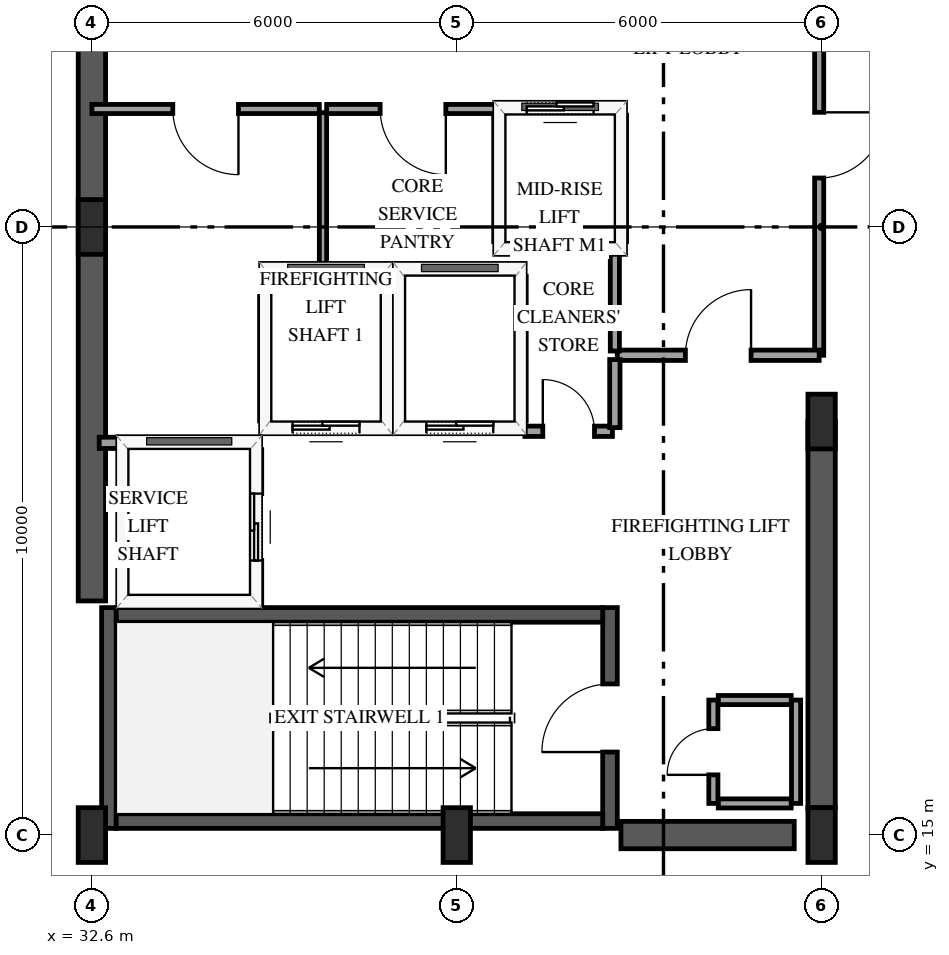
"""IFC4 building model, lengths in metres.
Left out: names, types, materials, properties, quantities, classifications, styles, units other than length and angle.
Written with IfcOpenShell. Run it as: python <this file> out.ifc"""

import sys

from ifc_helpers import new_model, si_unit, direction, frame, frame_2d, origin, origin_2d, place, context, subcontext, project, spatial, rectangle, extrude, element, fill, save


model = new_model("IFC4")
c1 = context("Model", 3, precision=1e-05, world=origin(), true_north=direction((0.0, 1.0)))
c2 = subcontext(c1, "Body", "Model", "MODEL_VIEW")
j1 = project(units=[si_unit("LENGTHUNIT", "METRE"), si_unit("PLANEANGLEUNIT", "RADIAN")], contexts=[c1])
p1 = place(None, origin())
s1 = spatial("IfcSite", under=j1, at=p1, CompositionType="ELEMENT")
p2 = place(p1, origin())
s2 = spatial("IfcBuilding", under=s1, at=p2, CompositionType="ELEMENT")
p3 = place(p2, frame((0.0, 0.0, 237.4)))
s3 = spatial("IfcBuildingStorey", under=s2, at=p3, CompositionType="ELEMENT", Elevation=237.4)
p4 = place(p3, frame((32.88, 15.11, 0.0), z_axis=(0.0, 0.0, 1.0), x_axis=(0.0, 1.0, 0.0)))
e1 = element("IfcWall", 1, at=p4, inside=s3, PredefinedType="SHEAR", context=c2, shape_type="SweptSolid", body=[
    extrude(rectangle(XDim=3.63, YDim=0.24, at=frame_2d((1.815, 0.0))), origin(), (0.0, 0.0, 1.0), 5.1),
])
p5 = place(p3, frame((41.12, 15.11, 0.0), z_axis=(0.0, 0.0, 1.0), x_axis=(0.0, 1.0, 0.0)))
e2 = element("IfcWall", 2, at=p5, inside=s3, PredefinedType="SHEAR", context=c2, shape_type="SweptSolid", body=[
    extrude(rectangle(XDim=3.63, YDim=0.24, at=frame_2d((1.815, 0.0))), origin(), (0.0, 0.0, 1.0), 5.1),
])
p6 = place(p5, frame((1.255, 0.0, 0.0)))
e3 = element("IfcOpeningElement", 3, at=p6, cuts=e2, PredefinedType="OPENING", context=c2, shape_type="SweptSolid", body=[
    extrude(rectangle(XDim=1.12, YDim=2.15, at=frame_2d((0.56, 1.075))), frame((0.0, 0.13, 0.0), z_axis=(0.0, -1.0, 0.0), x_axis=(1.0, 0.0, 0.0)), (0.0, 0.0, 1.0), 0.26),
])
for number, where, z_axis, x_axis in (
    (4, (33.0, 15.23, 0.0), (0.0, 0.0, 1.0), (1.0, 0.0, 0.0)),
    (5, (33.0, 18.62, 0.0), (0.0, 0.0, 1.0), (1.0, 0.0, 0.0)),
):
    element("IfcWall", number, at=place(p3, frame(where, z_axis=z_axis, x_axis=x_axis)), inside=s3, PredefinedType="SHEAR", context=c2, shape_type="SweptSolid", body=[
        extrude(rectangle(XDim=8.0, YDim=0.24, at=frame_2d((4.0, 0.0))), origin(), (0.0, 0.0, 1.0), 5.1),
    ])
p7 = place(p3, frame((32.6, 18.85, 0.0), z_axis=(0.0, 0.0, 1.0), x_axis=(0.0, 1.0, 0.0)))
e6 = element("IfcWall", 6, at=p7, inside=s3, PredefinedType="SHEAR", context=c2, shape_type="SweptSolid", body=[
    extrude(rectangle(XDim=12.3, YDim=0.45, at=frame_2d((6.15, 0.0))), origin(), (0.0, 0.0, 1.0), 5.1),
])
p8 = place(p3, frame((41.3, 15.0, 0.0), z_axis=(0.0, 0.0, 1.0), x_axis=(1.0, 0.0, 0.0)))
e7 = element("IfcWall", 7, at=p8, inside=s3, PredefinedType="SHEAR", context=c2, shape_type="SweptSolid", body=[
    extrude(rectangle(XDim=2.85, YDim=0.45, at=frame_2d((1.425, 0.0))), origin(), (0.0, 0.0, 1.0), 5.1),
])
p9 = place(p3, frame((44.6, 15.45, 0.0), z_axis=(0.0, 0.0, 1.0), x_axis=(0.0, 1.0, 0.0)))
e8 = element("IfcWall", 8, at=p9, inside=s3, PredefinedType="SHEAR", context=c2, shape_type="SweptSolid", body=[
    extrude(rectangle(XDim=6.35, YDim=0.45, at=frame_2d((3.175, 0.0))), origin(), (0.0, 0.0, 1.0), 5.1),
])
for number, where, z_axis, x_axis in (
    (9, (32.6, 15.0, 0.0), (0.0, 0.0, 1.0), (1.0, 0.0, 0.0)),
    (10, (32.6, 25.0, 0.0), (0.0, 0.0, 1.0), (1.0, 0.0, 0.0)),
    (11, (38.6, 15.0, 0.0), (0.0, 0.0, 1.0), (1.0, 0.0, 0.0)),
    (12, (44.6, 15.0, 0.0), (0.0, 0.0, 1.0), (1.0, 0.0, 0.0)),
    (13, (44.6, 21.8, 0.0), (0.0, 0.0, 1.0), (1.0, 0.0, 0.0)),
):
    element("IfcColumn", number, at=place(p3, frame(where, z_axis=z_axis, x_axis=x_axis)), inside=s3, PredefinedType="PILASTER", context=c2, shape_type="SweptSolid", body=[
        extrude(rectangle(XDim=0.45, YDim=0.9, at=origin_2d()), origin(), (0.0, 0.0, 1.0), 4.8),
    ])
p10 = place(p3, frame((35.45, 21.7, 0.0), z_axis=(0.0, 0.0, 1.0), x_axis=(1.0, 0.0, 0.0)))
e14 = element("IfcWall", 14, at=p10, inside=s3, PredefinedType="SOLIDWALL", context=c2, shape_type="SweptSolid", body=[
    extrude(rectangle(XDim=2.0, YDim=0.185, at=frame_2d((1.0, 0.0))), origin(), (0.0, 0.0, 1.0), 4.8),
])
p11 = place(p10, frame((0.45, 0.0, 0.0)))
e15 = element("IfcOpeningElement", 15, at=p11, cuts=e14, PredefinedType="OPENING", context=c2, shape_type="SweptSolid", body=[
    extrude(rectangle(XDim=1.1, YDim=2.15, at=frame_2d((0.55, 1.075))), frame((0.0, 0.103, 0.0), z_axis=(0.0, -1.0, 0.0), x_axis=(1.0, 0.0, 0.0)), (0.0, 0.0, 1.0), 0.205),
])
p12 = place(p3, frame((35.45, 24.3, 0.0), z_axis=(0.0, 0.0, 1.0), x_axis=(1.0, 0.0, 0.0)))
e16 = element("IfcWall", 16, at=p12, inside=s3, PredefinedType="SOLIDWALL", context=c2, shape_type="SweptSolid", body=[
    extrude(rectangle(XDim=2.0, YDim=0.185, at=frame_2d((1.0, 0.0))), origin(), (0.0, 0.0, 1.0), 4.8),
])
for number, where, z_axis, x_axis in (
    (17, (35.45, 21.81, 0.0), (0.0, 0.0, 1.0), (0.0, 1.0, 0.0)),
    (18, (37.45, 21.81, 0.0), (0.0, 0.0, 1.0), (0.0, 1.0, 0.0)),
):
    element("IfcWall", number, at=place(p3, frame(where, z_axis=z_axis, x_axis=x_axis)), inside=s3, PredefinedType="SOLIDWALL", context=c2, shape_type="SweptSolid", body=[
        extrude(rectangle(XDim=2.38, YDim=0.185, at=frame_2d((1.19, 0.0))), origin(), (0.0, 0.0, 1.0), 4.8),
    ])
p13 = place(p3, frame((37.65, 21.7, 0.0), z_axis=(0.0, 0.0, 1.0), x_axis=(1.0, 0.0, 0.0)))
e19 = element("IfcWall", 19, at=p13, inside=s3, PredefinedType="SOLIDWALL", context=c2, shape_type="SweptSolid", body=[
    extrude(rectangle(XDim=2.0, YDim=0.185, at=frame_2d((1.0, 0.0))), origin(), (0.0, 0.0, 1.0), 4.8),
])
p14 = place(p13, frame((0.45, 0.0, 0.0)))
e20 = element("IfcOpeningElement", 20, at=p14, cuts=e19, PredefinedType="OPENING", context=c2, shape_type="SweptSolid", body=[
    extrude(rectangle(XDim=1.1, YDim=2.15, at=frame_2d((0.55, 1.075))), frame((0.0, 0.103, 0.0), z_axis=(0.0, -1.0, 0.0), x_axis=(1.0, 0.0, 0.0)), (0.0, 0.0, 1.0), 0.205),
])
p15 = place(p3, frame((37.65, 24.3, 0.0), z_axis=(0.0, 0.0, 1.0), x_axis=(1.0, 0.0, 0.0)))
e21 = element("IfcWall", 21, at=p15, inside=s3, PredefinedType="SOLIDWALL", context=c2, shape_type="SweptSolid", body=[
    extrude(rectangle(XDim=2.0, YDim=0.185, at=frame_2d((1.0, 0.0))), origin(), (0.0, 0.0, 1.0), 4.8),
])
p16 = place(p3, frame((39.65, 21.81, 0.0), z_axis=(0.0, 0.0, 1.0), x_axis=(0.0, 1.0, 0.0)))
e22 = element("IfcWall", 22, at=p16, inside=s3, PredefinedType="SOLIDWALL", context=c2, shape_type="SweptSolid", body=[
    extrude(rectangle(XDim=2.38, YDim=0.185, at=frame_2d((1.19, 0.0))), origin(), (0.0, 0.0, 1.0), 4.8),
])
p17 = place(p3, frame((32.72, 21.45, 0.0), z_axis=(0.0, 0.0, 1.0), x_axis=(1.0, 0.0, 0.0)))
e23 = element("IfcWall", 23, at=p17, inside=s3, PredefinedType="SOLIDWALL", context=c2, shape_type="SweptSolid", body=[
    extrude(rectangle(XDim=2.58, YDim=0.185, at=frame_2d((1.29, 0.0))), origin(), (0.0, 0.0, 1.0), 4.8),
])
p18 = place(p3, frame((35.3, 18.79, 0.0), z_axis=(0.0, 0.0, 1.0), x_axis=(0.0, 1.0, 0.0)))
e24 = element("IfcWall", 24, at=p18, inside=s3, PredefinedType="SOLIDWALL", context=c2, shape_type="SweptSolid", body=[
    extrude(rectangle(XDim=2.55, YDim=0.185, at=frame_2d((1.275, 0.0))), origin(), (0.0, 0.0, 1.0), 4.8),
])
p19 = place(p18, frame((0.725, 0.0, 0.0)))
e25 = element("IfcOpeningElement", 25, at=p19, cuts=e24, PredefinedType="OPENING", context=c2, shape_type="SweptSolid", body=[
    extrude(rectangle(XDim=1.1, YDim=2.15, at=frame_2d((0.55, 1.075))), frame((0.0, 0.103, 0.0), z_axis=(0.0, -1.0, 0.0), x_axis=(1.0, 0.0, 0.0)), (0.0, 0.0, 1.0), 0.205),
])
p20 = place(p3, frame((39.3, 24.65, 0.0), z_axis=(0.0, 0.0, 1.0), x_axis=(1.0, 0.0, 0.0)))
e26 = element("IfcWall", 26, at=p20, inside=s3, PredefinedType="SOLIDWALL", context=c2, shape_type="SweptSolid", body=[
    extrude(rectangle(XDim=2.0, YDim=0.185, at=frame_2d((1.0, 0.0))), origin(), (0.0, 0.0, 1.0), 4.8),
])
p21 = place(p3, frame((39.3, 26.95, 0.0), z_axis=(0.0, 0.0, 1.0), x_axis=(1.0, 0.0, 0.0)))
e27 = element("IfcWall", 27, at=p21, inside=s3, PredefinedType="SOLIDWALL", context=c2, shape_type="SweptSolid", body=[
    extrude(rectangle(XDim=2.0, YDim=0.185, at=frame_2d((1.0, 0.0))), origin(), (0.0, 0.0, 1.0), 4.8),
])
p22 = place(p21, frame((0.45, 0.0, 0.0)))
e28 = element("IfcOpeningElement", 28, at=p22, cuts=e27, PredefinedType="OPENING", context=c2, shape_type="SweptSolid", body=[
    extrude(rectangle(XDim=1.1, YDim=2.15, at=frame_2d((0.55, 1.075))), frame((0.0, 0.103, 0.0), z_axis=(0.0, -1.0, 0.0), x_axis=(1.0, 0.0, 0.0)), (0.0, 0.0, 1.0), 0.205),
])
for number, where, z_axis, x_axis in (
    (29, (39.3, 24.76, 0.0), (0.0, 0.0, 1.0), (0.0, 1.0, 0.0)),
    (30, (41.3, 24.76, 0.0), (0.0, 0.0, 1.0), (0.0, 1.0, 0.0)),
):
    element("IfcWall", number, at=place(p3, frame(where, z_axis=z_axis, x_axis=x_axis)), inside=s3, PredefinedType="SOLIDWALL", context=c2, shape_type="SweptSolid", body=[
        extrude(rectangle(XDim=2.08, YDim=0.185, at=frame_2d((1.04, 0.0))), origin(), (0.0, 0.0, 1.0), 4.8),
    ])
for number, where, z_axis, x_axis in (
    (31, (42.9, 15.52, 0.0), (0.0, 0.0, 1.0), (1.0, 0.0, 0.0)),
    (32, (42.9, 17.22, 0.0), (0.0, 0.0, 1.0), (1.0, 0.0, 0.0)),
):
    element("IfcWall", number, at=place(p3, frame(where, z_axis=z_axis, x_axis=x_axis)), inside=s3, PredefinedType="PARTITIONING", context=c2, shape_type="SweptSolid", body=[
        extrude(rectangle(XDim=1.2, YDim=0.15, at=frame_2d((0.6, 0.0))), origin(), (0.0, 0.0, 1.0), 4.8),
    ])
p23 = place(p3, frame((44.18, 15.52, 0.0), z_axis=(0.0, 0.0, 1.0), x_axis=(0.0, 1.0, 0.0)))
e33 = element("IfcWall", 33, at=p23, inside=s3, PredefinedType="PARTITIONING", context=c2, shape_type="SweptSolid", body=[
    extrude(rectangle(XDim=1.7, YDim=0.15, at=frame_2d((0.85, 0.0))), origin(), (0.0, 0.0, 1.0), 4.8),
])
p24 = place(p3, frame((42.82, 15.52, 0.0), z_axis=(0.0, 0.0, 1.0), x_axis=(0.0, 1.0, 0.0)))
e34 = element("IfcWall", 34, at=p24, inside=s3, PredefinedType="PARTITIONING", context=c2, shape_type="SweptSolid", body=[
    extrude(rectangle(XDim=1.7, YDim=0.15, at=frame_2d((0.85, 0.0))), origin(), (0.0, 0.0, 1.0), 4.8),
])
p25 = place(p24, frame((0.47, 0.0, 0.0)))
e35 = element("IfcOpeningElement", 35, at=p25, cuts=e34, PredefinedType="OPENING", context=c2, shape_type="SweptSolid", body=[
    extrude(rectangle(XDim=0.76, YDim=2.0, at=frame_2d((0.38, 1.0))), frame((0.0, 0.085, 0.0), z_axis=(0.0, -1.0, 0.0), x_axis=(1.0, 0.0, 0.0)), (0.0, 0.0, 1.0), 0.17),
])
p26 = place(p3, frame((44.56, 29.8, 0.0), z_axis=(0.0, 0.0, 1.0), x_axis=(0.0, -1.0, 0.0)))
e36 = element("IfcWall", 36, at=p26, inside=s3, PredefinedType="PARTITIONING", context=c2, shape_type="SweptSolid", body=[
    extrude(rectangle(XDim=6.91, YDim=0.15, at=frame_2d((3.455, 0.0))), origin(), (0.0, 0.0, 1.0), 3.84),
])
p27 = place(p26, frame((2.915, 0.0, 0.0)))
e37 = element("IfcOpeningElement", 37, at=p27, cuts=e36, PredefinedType="OPENING", context=c2, shape_type="SweptSolid", body=[
    extrude(rectangle(XDim=1.08, YDim=2.15, at=frame_2d((0.54, 1.075))), frame((0.0, 0.085, 0.0), z_axis=(0.0, -1.0, 0.0), x_axis=(1.0, 0.0, 0.0)), (0.0, 0.0, 1.0), 0.17),
])
p28 = place(p3, frame((36.34, 26.94, 0.0), z_axis=(0.0, 0.0, 1.0), x_axis=(-1.0, 0.0, 0.0)))
e38 = element("IfcWall", 38, at=p28, inside=s3, PredefinedType="PARTITIONING", context=c2, shape_type="SweptSolid", body=[
    extrude(rectangle(XDim=3.74, YDim=0.15, at=frame_2d((1.87, 0.0))), origin(), (0.0, 0.0, 1.0), 4.8),
])
p29 = place(p28, frame((1.33, 0.0, 0.0)))
e39 = element("IfcOpeningElement", 39, at=p29, cuts=e38, PredefinedType="OPENING", context=c2, shape_type="SweptSolid", body=[
    extrude(rectangle(XDim=1.08, YDim=2.15, at=frame_2d((0.54, 1.075))), frame((0.0, 0.085, 0.0), z_axis=(0.0, -1.0, 0.0), x_axis=(1.0, 0.0, 0.0)), (0.0, 0.0, 1.0), 0.17),
])
p30 = place(p3, frame((41.24, 22.89, 0.0), z_axis=(0.0, 0.0, 1.0), x_axis=(1.0, 0.0, 0.0)))
e40 = element("IfcWall", 40, at=p30, inside=s3, PredefinedType="PARTITIONING", context=c2, shape_type="SweptSolid", body=[
    extrude(rectangle(XDim=3.32, YDim=0.17, at=frame_2d((1.66, 0.0))), origin(), (0.0, 0.0, 1.0), 4.8),
])
p31 = place(p30, frame((1.12, 0.0, 0.0)))
e41 = element("IfcOpeningElement", 41, at=p31, cuts=e40, PredefinedType="OPENING", context=c2, shape_type="SweptSolid", body=[
    extrude(rectangle(XDim=1.08, YDim=2.15, at=frame_2d((0.54, 1.075))), frame((0.0, 0.095, 0.0), z_axis=(0.0, -1.0, 0.0), x_axis=(1.0, 0.0, 0.0)), (0.0, 0.0, 1.0), 0.19),
])
p32 = place(p3, frame((39.3, 26.94, 0.0), z_axis=(0.0, 0.0, 1.0), x_axis=(-1.0, 0.0, 0.0)))
e42 = element("IfcWall", 42, at=p32, inside=s3, PredefinedType="PARTITIONING", context=c2, shape_type="SweptSolid", body=[
    extrude(rectangle(XDim=2.84, YDim=0.15, at=frame_2d((1.42, 0.0))), origin(), (0.0, 0.0, 1.0), 4.8),
])
p33 = place(p32, frame((0.88, 0.0, 0.0)))
e43 = element("IfcOpeningElement", 43, at=p33, cuts=e42, PredefinedType="OPENING", context=c2, shape_type="SweptSolid", body=[
    extrude(rectangle(XDim=1.08, YDim=2.15, at=frame_2d((0.54, 1.075))), frame((0.0, 0.085, 0.0), z_axis=(0.0, -1.0, 0.0), x_axis=(1.0, 0.0, 0.0)), (0.0, 0.0, 1.0), 0.17),
])
p34 = place(p3, frame((36.4, 26.88, 0.0), z_axis=(0.0, 0.0, 1.0), x_axis=(0.0, -1.0, 0.0)))
e44 = element("IfcWall", 44, at=p34, inside=s3, PredefinedType="PARTITIONING", context=c2, shape_type="SweptSolid", body=[
    extrude(rectangle(XDim=2.58, YDim=0.12, at=frame_2d((1.29, 0.0))), origin(), (0.0, 0.0, 1.0), 4.8),
])
p35 = place(p3, frame((41.2, 22.96, 0.0), z_axis=(0.0, 0.0, 1.0), x_axis=(0.0, 1.0, 0.0)))
e45 = element("IfcWall", 45, at=p35, inside=s3, PredefinedType="PARTITIONING", context=c2, shape_type="SweptSolid", body=[
    extrude(rectangle(XDim=1.69, YDim=0.15, at=frame_2d((0.845, 0.0))), origin(), (0.0, 0.0, 1.0), 4.8),
])
p36 = place(p3, frame((39.72, 21.64, 0.0), z_axis=(0.0, 0.0, 1.0), x_axis=(1.0, 0.0, 0.0)))
e46 = element("IfcWall", 46, at=p36, inside=s3, PredefinedType="PARTITIONING", context=c2, shape_type="SweptSolid", body=[
    extrude(rectangle(XDim=1.44, YDim=0.17, at=frame_2d((0.72, 0.0))), origin(), (0.0, 0.0, 1.0), 4.8),
])
p37 = place(p36, frame((0.295, 0.0, 0.0)))
e47 = element("IfcOpeningElement", 47, at=p37, cuts=e46, PredefinedType="OPENING", context=c2, shape_type="SweptSolid", body=[
    extrude(rectangle(XDim=0.85, YDim=2.1, at=frame_2d((0.425, 1.05))), frame((0.0, 0.095, 0.0), z_axis=(0.0, -1.0, 0.0), x_axis=(1.0, 0.0, 0.0)), (0.0, 0.0, 1.0), 0.19),
])
p38 = place(p3, frame((41.2, 21.7, 0.0), z_axis=(0.0, 0.0, 1.0), x_axis=(0.0, 1.0, 0.0)))
e48 = element("IfcWall", 48, at=p38, inside=s3, PredefinedType="PARTITIONING", context=c2, shape_type="SweptSolid", body=[
    extrude(rectangle(XDim=1.12, YDim=0.17, at=frame_2d((0.56, 0.0))), origin(), (0.0, 0.0, 1.0), 4.8),
])
p39 = place(p11, origin())
e49 = element("IfcDoor", 49, at=p39, inside=s3, OperationType="SLIDING_TO_LEFT", PredefinedType="DOOR", context=c2, shape_type="SweptSolid", body=[
    extrude(rectangle(XDim=1.1, YDim=2.15, at=frame_2d((0.55, 1.075))), frame((0.0, 0.025, 0.0), z_axis=(0.0, -1.0, 0.0), x_axis=(1.0, 0.0, 0.0)), (0.0, 0.0, 1.0), 0.05),
])
fill(e15, e49)
p40 = place(p14, origin())
e50 = element("IfcDoor", 50, at=p40, inside=s3, OperationType="SLIDING_TO_LEFT", PredefinedType="DOOR", context=c2, shape_type="SweptSolid", body=[
    extrude(rectangle(XDim=1.1, YDim=2.15, at=frame_2d((0.55, 1.075))), frame((0.0, 0.025, 0.0), z_axis=(0.0, -1.0, 0.0), x_axis=(1.0, 0.0, 0.0)), (0.0, 0.0, 1.0), 0.05),
])
fill(e20, e50)
p41 = place(p19, origin())
e51 = element("IfcDoor", 51, at=p41, inside=s3, OperationType="SLIDING_TO_LEFT", PredefinedType="DOOR", context=c2, shape_type="SweptSolid", body=[
    extrude(rectangle(XDim=1.1, YDim=2.15, at=frame_2d((0.55, 1.075))), frame((0.0, 0.025, 0.0), z_axis=(0.0, -1.0, 0.0), x_axis=(1.0, 0.0, 0.0)), (0.0, 0.0, 1.0), 0.05),
])
fill(e25, e51)
p42 = place(p22, origin())
e52 = element("IfcDoor", 52, at=p42, inside=s3, OperationType="SLIDING_TO_LEFT", PredefinedType="DOOR", context=c2, shape_type="SweptSolid", body=[
    extrude(rectangle(XDim=1.1, YDim=2.15, at=frame_2d((0.55, 1.075))), frame((0.0, 0.025, 0.0), z_axis=(0.0, -1.0, 0.0), x_axis=(1.0, 0.0, 0.0)), (0.0, 0.0, 1.0), 0.05),
])
fill(e28, e52)
p43 = place(p6, origin())
e53 = element("IfcDoor", 53, at=p43, inside=s3, OperationType="SINGLE_SWING_LEFT", PredefinedType="DOOR", context=c2, shape_type="SweptSolid", body=[
    extrude(rectangle(XDim=1.12, YDim=2.15, at=frame_2d((0.56, 1.075))), frame((0.0, 0.025, 0.0), z_axis=(0.0, -1.0, 0.0), x_axis=(1.0, 0.0, 0.0)), (0.0, 0.0, 1.0), 0.05),
])
fill(e3, e53)
p44 = place(p25, origin())
e54 = element("IfcDoor", 54, at=p44, inside=s3, OperationType="SINGLE_SWING_LEFT", PredefinedType="TRAPDOOR", context=c2, shape_type="SweptSolid", body=[
    extrude(rectangle(XDim=0.76, YDim=2.0, at=frame_2d((0.38, 1.0))), frame((0.0, 0.025, 0.0), z_axis=(0.0, -1.0, 0.0), x_axis=(1.0, 0.0, 0.0)), (0.0, 0.0, 1.0), 0.05),
])
fill(e35, e54)
p45 = place(p27, origin())
e55 = element("IfcDoor", 55, at=p45, inside=s3, OperationType="SINGLE_SWING_LEFT", PredefinedType="DOOR", context=c2, shape_type="SweptSolid", body=[
    extrude(rectangle(XDim=1.08, YDim=2.15, at=frame_2d((0.54, 1.075))), frame((0.0, 0.025, 0.0), z_axis=(0.0, -1.0, 0.0), x_axis=(1.0, 0.0, 0.0)), (0.0, 0.0, 1.0), 0.05),
])
fill(e37, e55)
p46 = place(p29, origin())
e56 = element("IfcDoor", 56, at=p46, inside=s3, OperationType="SINGLE_SWING_LEFT", PredefinedType="DOOR", context=c2, shape_type="SweptSolid", body=[
    extrude(rectangle(XDim=1.08, YDim=2.15, at=frame_2d((0.54, 1.075))), frame((0.0, 0.025, 0.0), z_axis=(0.0, -1.0, 0.0), x_axis=(1.0, 0.0, 0.0)), (0.0, 0.0, 1.0), 0.05),
])
fill(e39, e56)
p47 = place(p31, origin())
e57 = element("IfcDoor", 57, at=p47, inside=s3, OperationType="SINGLE_SWING_RIGHT", PredefinedType="DOOR", context=c2, shape_type="SweptSolid", body=[
    extrude(rectangle(XDim=1.08, YDim=2.15, at=frame_2d((0.54, 1.075))), frame((0.0, 0.025, 0.0), z_axis=(0.0, -1.0, 0.0), x_axis=(1.0, 0.0, 0.0)), (0.0, 0.0, 1.0), 0.05),
])
fill(e41, e57)
p48 = place(p33, origin())
e58 = element("IfcDoor", 58, at=p48, inside=s3, OperationType="SINGLE_SWING_LEFT", PredefinedType="DOOR", context=c2, shape_type="SweptSolid", body=[
    extrude(rectangle(XDim=1.08, YDim=2.15, at=frame_2d((0.54, 1.075))), frame((0.0, 0.025, 0.0), z_axis=(0.0, -1.0, 0.0), x_axis=(1.0, 0.0, 0.0)), (0.0, 0.0, 1.0), 0.05),
])
fill(e43, e58)
p49 = place(p37, origin())
e59 = element("IfcDoor", 59, at=p49, inside=s3, OperationType="SINGLE_SWING_LEFT", PredefinedType="DOOR", context=c2, shape_type="SweptSolid", body=[
    extrude(rectangle(XDim=0.85, YDim=2.1, at=frame_2d((0.425, 1.05))), frame((0.0, 0.025, 0.0), z_axis=(0.0, -1.0, 0.0), x_axis=(1.0, 0.0, 0.0)), (0.0, 0.0, 1.0), 0.05),
])
fill(e47, e59)
save(model, sys.argv[1])
